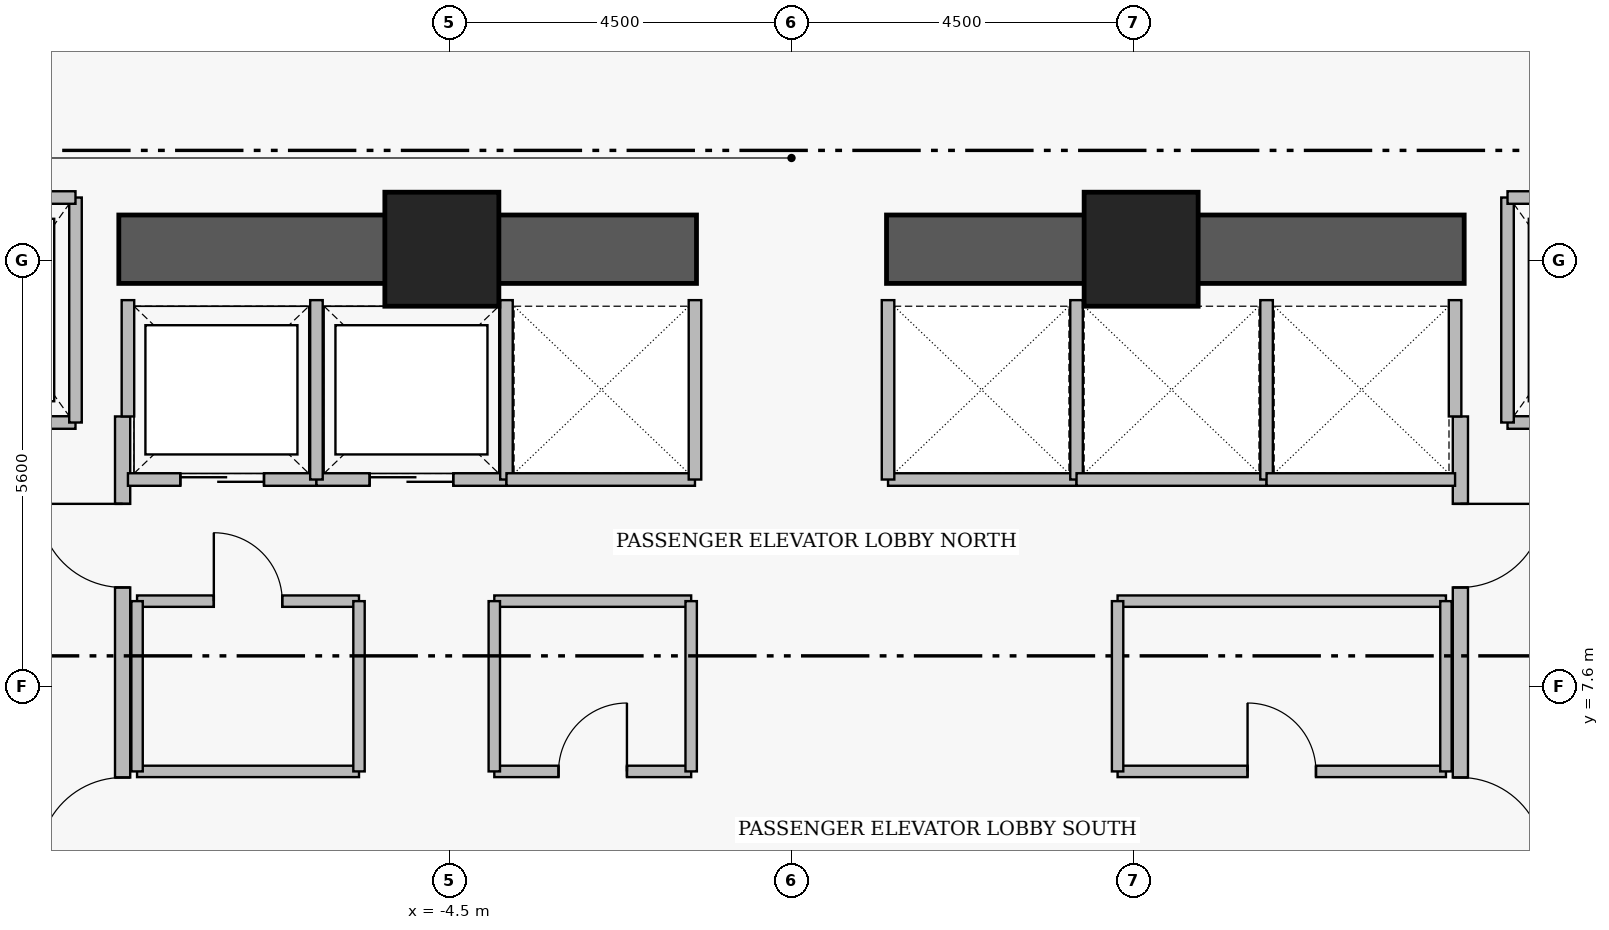
"""IFC4 building model, lengths in metres.
Left out: names, types, materials, properties, quantities, classifications, styles, units other than length and angle.
Written with IfcOpenShell. Run it as: python <this file> out.ifc"""

import sys

from ifc_helpers import new_model, si_unit, direction, frame, frame_2d, origin, origin_2d, place, context, subcontext, project, spatial, rectangle, extrude, element, fill, save


model = new_model("IFC4")
c1 = context("Model", 3, precision=1e-05, world=origin(), true_north=direction((0.0, 1.0)))
c2 = subcontext(c1, "Body", "Model", "MODEL_VIEW")
j1 = project(units=[si_unit("LENGTHUNIT", "METRE"), si_unit("PLANEANGLEUNIT", "RADIAN")], contexts=[c1])
p1 = place(None, origin())
s1 = spatial("IfcSite", under=j1, at=p1, CompositionType="ELEMENT")
p2 = place(p1, origin())
s2 = spatial("IfcBuilding", under=s1, at=p2, CompositionType="ELEMENT")
p3 = place(p2, frame((0.0, 0.0, 27.6)))
s3 = spatial("IfcBuildingStorey", under=s2, at=p3, CompositionType="ELEMENT", Elevation=27.6)
for number, where, z_axis, x_axis in (
    (1, (-8.85, 13.35, 0.0), (0.0, 0.0, 1.0), (1.0, 0.0, 0.0)),
    (2, (1.25, 13.35, 0.0), (0.0, 0.0, 1.0), (1.0, 0.0, 0.0)),
):
    element("IfcWall", number, at=place(p3, frame(where, z_axis=z_axis, x_axis=x_axis)), inside=s3, PredefinedType="SHEAR", context=c2, shape_type="SweptSolid", body=[
        extrude(rectangle(XDim=7.6, YDim=0.9, at=frame_2d((3.8, 0.0))), origin(), (0.0, 0.0, 1.0), 3.43),
    ])
for number, where, z_axis, x_axis in (
    (3, (-4.6, 13.35, 0.0), (0.0, 0.0, 1.0), (1.0, 0.0, 0.0)),
    (4, (4.6, 13.35, 0.0), (0.0, 0.0, 1.0), (1.0, 0.0, 0.0)),
):
    element("IfcColumn", number, at=place(p3, frame(where, z_axis=z_axis, x_axis=x_axis)), inside=s3, PredefinedType="COLUMN", context=c2, shape_type="SweptSolid", body=[
        extrude(rectangle(XDim=1.5, YDim=1.5, at=origin_2d()), origin(), (0.0, 0.0, 1.0), 3.65),
    ])
p4 = place(p3, frame((-8.8, 5.05, 0.0), z_axis=(0.0, 0.0, 1.0), x_axis=(0.0, 1.0, 0.0)))
e5 = element("IfcWall", 5, at=p4, inside=s3, PredefinedType="PARTITIONING", context=c2, shape_type="SweptSolid", body=[
    extrude(rectangle(XDim=6.1, YDim=0.2, at=frame_2d((3.05, 0.0))), origin(), (0.0, 0.0, 1.0), 3.43),
])
p5 = place(p4, frame((0.25, 0.0, 0.0)))
e6 = element("IfcOpeningElement", 6, at=p5, cuts=e5, PredefinedType="OPENING", context=c2, shape_type="SweptSolid", body=[
    extrude(rectangle(XDim=1.1, YDim=2.2, at=frame_2d((0.55, 1.1))), frame((0.0, 0.11, 0.0), z_axis=(0.0, -1.0, 0.0), x_axis=(1.0, 0.0, 0.0)), (0.0, 0.0, 1.0), 0.22),
])
p6 = place(p4, frame((3.85, 0.0, 0.0)))
e7 = element("IfcOpeningElement", 7, at=p6, cuts=e5, PredefinedType="OPENING", context=c2, shape_type="SweptSolid", body=[
    extrude(rectangle(XDim=1.1, YDim=2.2, at=frame_2d((0.55, 1.1))), frame((0.0, 0.11, 0.0), z_axis=(0.0, -1.0, 0.0), x_axis=(1.0, 0.0, 0.0)), (0.0, 0.0, 1.0), 0.22),
])
p7 = place(p3, frame((8.8, 11.15, 0.0), z_axis=(0.0, 0.0, 1.0), x_axis=(0.0, -1.0, 0.0)))
e8 = element("IfcWall", 8, at=p7, inside=s3, PredefinedType="PARTITIONING", context=c2, shape_type="SweptSolid", body=[
    extrude(rectangle(XDim=6.1, YDim=0.2, at=frame_2d((3.05, 0.0))), origin(), (0.0, 0.0, 1.0), 3.43),
])
p8 = place(p7, frame((1.15, 0.0, 0.0)))
e9 = element("IfcOpeningElement", 9, at=p8, cuts=e8, PredefinedType="OPENING", context=c2, shape_type="SweptSolid", body=[
    extrude(rectangle(XDim=1.1, YDim=2.2, at=frame_2d((0.55, 1.1))), frame((0.0, 0.11, 0.0), z_axis=(0.0, -1.0, 0.0), x_axis=(1.0, 0.0, 0.0)), (0.0, 0.0, 1.0), 0.22),
])
p9 = place(p7, frame((4.75, 0.0, 0.0)))
e10 = element("IfcOpeningElement", 10, at=p9, cuts=e8, PredefinedType="OPENING", context=c2, shape_type="SweptSolid", body=[
    extrude(rectangle(XDim=1.1, YDim=2.2, at=frame_2d((0.55, 1.1))), frame((0.0, 0.11, 0.0), z_axis=(0.0, -1.0, 0.0), x_axis=(1.0, 0.0, 0.0)), (0.0, 0.0, 1.0), 0.22),
])
p10 = place(p3, frame((-11.58, 11.07, 0.0), z_axis=(0.0, 0.0, 1.0), x_axis=(1.0, 0.0, 0.0)))
e11 = element("IfcWall", 11, at=p10, inside=s3, PredefinedType="PARTITIONING", context=c2, shape_type="SweptSolid", body=[
    extrude(rectangle(XDim=2.16, YDim=0.165, at=frame_2d((1.08, 0.0))), origin(), (0.0, 0.0, 1.0), 3.43),
])
p11 = place(p10, frame((0.53, 0.0, 0.0)))
e12 = element("IfcOpeningElement", 12, at=p11, cuts=e11, PredefinedType="OPENING", context=c2, shape_type="SweptSolid", body=[
    extrude(rectangle(XDim=1.15, YDim=2.25, at=frame_2d((0.575, 1.125))), frame((0.0, 0.093, 0.0), z_axis=(0.0, -1.0, 0.0), x_axis=(1.0, 0.0, 0.0)), (0.0, 0.0, 1.0), 0.185),
])
p12 = place(p3, frame((9.42, 11.07, 0.0), z_axis=(0.0, 0.0, 1.0), x_axis=(1.0, 0.0, 0.0)))
e13 = element("IfcWall", 13, at=p12, inside=s3, PredefinedType="PARTITIONING", context=c2, shape_type="SweptSolid", body=[
    extrude(rectangle(XDim=2.16, YDim=0.165, at=frame_2d((1.08, 0.0))), origin(), (0.0, 0.0, 1.0), 3.43),
])
p13 = place(p12, frame((0.53, 0.0, 0.0)))
e14 = element("IfcOpeningElement", 14, at=p13, cuts=e13, PredefinedType="OPENING", context=c2, shape_type="SweptSolid", body=[
    extrude(rectangle(XDim=1.15, YDim=2.25, at=frame_2d((0.575, 1.125))), frame((0.0, 0.093, 0.0), z_axis=(0.0, -1.0, 0.0), x_axis=(1.0, 0.0, 0.0)), (0.0, 0.0, 1.0), 0.185),
])
p14 = place(p3, frame((-8.73, 10.32, 0.0), z_axis=(0.0, 0.0, 1.0), x_axis=(1.0, 0.0, 0.0)))
e15 = element("IfcWall", 15, at=p14, inside=s3, PredefinedType="PARTITIONING", context=c2, shape_type="SweptSolid", body=[
    extrude(rectangle(XDim=2.48, YDim=0.165, at=frame_2d((1.24, 0.0))), origin(), (0.0, 0.0, 1.0), 3.43),
])
p15 = place(p14, frame((0.69, 0.0, 0.0)))
e16 = element("IfcOpeningElement", 16, at=p15, cuts=e15, PredefinedType="OPENING", context=c2, shape_type="SweptSolid", body=[
    extrude(rectangle(XDim=1.1, YDim=2.25, at=frame_2d((0.55, 1.125))), frame((0.0, 0.093, 0.0), z_axis=(0.0, -1.0, 0.0), x_axis=(1.0, 0.0, 0.0)), (0.0, 0.0, 1.0), 0.185),
])
p16 = place(p3, frame((-6.25, 10.32, 0.0), z_axis=(0.0, 0.0, 1.0), x_axis=(1.0, 0.0, 0.0)))
e17 = element("IfcWall", 17, at=p16, inside=s3, PredefinedType="PARTITIONING", context=c2, shape_type="SweptSolid", body=[
    extrude(rectangle(XDim=2.5, YDim=0.165, at=frame_2d((1.25, 0.0))), origin(), (0.0, 0.0, 1.0), 3.43),
])
p17 = place(p16, frame((0.7, 0.0, 0.0)))
e18 = element("IfcOpeningElement", 18, at=p17, cuts=e17, PredefinedType="OPENING", context=c2, shape_type="SweptSolid", body=[
    extrude(rectangle(XDim=1.1, YDim=2.25, at=frame_2d((0.55, 1.125))), frame((0.0, 0.093, 0.0), z_axis=(0.0, -1.0, 0.0), x_axis=(1.0, 0.0, 0.0)), (0.0, 0.0, 1.0), 0.185),
])
p18 = place(p3, frame((-8.61, 8.72, 0.0), z_axis=(0.0, 0.0, 1.0), x_axis=(1.0, 0.0, 0.0)))
e19 = element("IfcWall", 19, at=p18, inside=s3, PredefinedType="PARTITIONING", context=c2, shape_type="SweptSolid", body=[
    extrude(rectangle(XDim=2.92, YDim=0.15, at=frame_2d((1.46, 0.0))), origin(), (0.0, 0.0, 1.0), 3.43),
])
p19 = place(p18, frame((1.01, 0.0, 0.0)))
e20 = element("IfcOpeningElement", 20, at=p19, cuts=e19, PredefinedType="OPENING", context=c2, shape_type="SweptSolid", body=[
    extrude(rectangle(XDim=0.9, YDim=2.15, at=frame_2d((0.45, 1.075))), frame((0.0, 0.085, 0.0), z_axis=(0.0, -1.0, 0.0), x_axis=(1.0, 0.0, 0.0)), (0.0, 0.0, 1.0), 0.17),
])
p20 = place(p3, frame((-3.91, 6.48, 0.0), z_axis=(0.0, 0.0, 1.0), x_axis=(1.0, 0.0, 0.0)))
e21 = element("IfcWall", 21, at=p20, inside=s3, PredefinedType="PARTITIONING", context=c2, shape_type="SweptSolid", body=[
    extrude(rectangle(XDim=2.59, YDim=0.15, at=frame_2d((1.295, 0.0))), origin(), (0.0, 0.0, 1.0), 3.43),
])
p21 = place(p20, frame((0.845, 0.0, 0.0)))
e22 = element("IfcOpeningElement", 22, at=p21, cuts=e21, PredefinedType="OPENING", context=c2, shape_type="SweptSolid", body=[
    extrude(rectangle(XDim=0.9, YDim=2.15, at=frame_2d((0.45, 1.075))), frame((0.0, 0.085, 0.0), z_axis=(0.0, -1.0, 0.0), x_axis=(1.0, 0.0, 0.0)), (0.0, 0.0, 1.0), 0.17),
])
p22 = place(p3, frame((4.29, 6.48, 0.0), z_axis=(0.0, 0.0, 1.0), x_axis=(1.0, 0.0, 0.0)))
e23 = element("IfcWall", 23, at=p22, inside=s3, PredefinedType="PARTITIONING", context=c2, shape_type="SweptSolid", body=[
    extrude(rectangle(XDim=4.32, YDim=0.15, at=frame_2d((2.16, 0.0))), origin(), (0.0, 0.0, 1.0), 3.43),
])
p23 = place(p22, frame((1.71, 0.0, 0.0)))
e24 = element("IfcOpeningElement", 24, at=p23, cuts=e23, PredefinedType="OPENING", context=c2, shape_type="SweptSolid", body=[
    extrude(rectangle(XDim=0.9, YDim=2.15, at=frame_2d((0.45, 1.075))), frame((0.0, 0.085, 0.0), z_axis=(0.0, -1.0, 0.0), x_axis=(1.0, 0.0, 0.0)), (0.0, 0.0, 1.0), 0.17),
])
p24 = place(p3, frame((-9.42, 11.07, 0.0), z_axis=(0.0, 0.0, 1.0), x_axis=(0.0, 1.0, 0.0)))
e25 = element("IfcWall", 25, at=p24, inside=s3, PredefinedType="PARTITIONING", context=c2, shape_type="SweptSolid", body=[
    extrude(rectangle(XDim=2.96, YDim=0.165, at=frame_2d((1.48, 0.0))), origin(), (0.0, 0.0, 1.0), 3.43),
])
p25 = place(p3, frame((-11.58, 14.03, 0.0), z_axis=(0.0, 0.0, 1.0), x_axis=(1.0, 0.0, 0.0)))
e26 = element("IfcWall", 26, at=p25, inside=s3, PredefinedType="PARTITIONING", context=c2, shape_type="SweptSolid", body=[
    extrude(rectangle(XDim=2.16, YDim=0.165, at=frame_2d((1.08, 0.0))), origin(), (0.0, 0.0, 1.0), 3.43),
])
p26 = place(p3, frame((9.42, 11.07, 0.0), z_axis=(0.0, 0.0, 1.0), x_axis=(0.0, 1.0, 0.0)))
e27 = element("IfcWall", 27, at=p26, inside=s3, PredefinedType="PARTITIONING", context=c2, shape_type="SweptSolid", body=[
    extrude(rectangle(XDim=2.96, YDim=0.165, at=frame_2d((1.48, 0.0))), origin(), (0.0, 0.0, 1.0), 3.43),
])
p27 = place(p3, frame((9.42, 14.03, 0.0), z_axis=(0.0, 0.0, 1.0), x_axis=(1.0, 0.0, 0.0)))
e28 = element("IfcWall", 28, at=p27, inside=s3, PredefinedType="PARTITIONING", context=c2, shape_type="SweptSolid", body=[
    extrude(rectangle(XDim=2.16, YDim=0.165, at=frame_2d((1.08, 0.0))), origin(), (0.0, 0.0, 1.0), 3.43),
])
p28 = place(p3, frame((-8.73, 11.15, 0.0), z_axis=(0.0, 0.0, 1.0), x_axis=(0.0, 1.0, 0.0)))
e29 = element("IfcWall", 29, at=p28, inside=s3, PredefinedType="PARTITIONING", context=c2, shape_type="SweptSolid", body=[
    extrude(rectangle(XDim=1.53, YDim=0.165, at=frame_2d((0.765, 0.0))), origin(), (0.0, 0.0, 1.0), 3.43),
])
for number, where, z_axis, x_axis in (
    (30, (-6.25, 10.32, 0.0), (0.0, 0.0, 1.0), (0.0, 1.0, 0.0)),
    (31, (-3.75, 10.32, 0.0), (0.0, 0.0, 1.0), (0.0, 1.0, 0.0)),
):
    element("IfcWall", number, at=place(p3, frame(where, z_axis=z_axis, x_axis=x_axis)), inside=s3, PredefinedType="PARTITIONING", context=c2, shape_type="SweptSolid", body=[
        extrude(rectangle(XDim=2.36, YDim=0.165, at=frame_2d((1.18, 0.0))), origin(), (0.0, 0.0, 1.0), 3.43),
    ])
p29 = place(p3, frame((-3.75, 10.32, 0.0), z_axis=(0.0, 0.0, 1.0), x_axis=(1.0, 0.0, 0.0)))
e32 = element("IfcWall", 32, at=p29, inside=s3, PredefinedType="PARTITIONING", context=c2, shape_type="SweptSolid", body=[
    extrude(rectangle(XDim=2.48, YDim=0.165, at=frame_2d((1.24, 0.0))), origin(), (0.0, 0.0, 1.0), 3.43),
])
p30 = place(p3, frame((-1.27, 10.32, 0.0), z_axis=(0.0, 0.0, 1.0), x_axis=(0.0, 1.0, 0.0)))
e33 = element("IfcWall", 33, at=p30, inside=s3, PredefinedType="PARTITIONING", context=c2, shape_type="SweptSolid", body=[
    extrude(rectangle(XDim=2.36, YDim=0.165, at=frame_2d((1.18, 0.0))), origin(), (0.0, 0.0, 1.0), 3.43),
])
p31 = place(p3, frame((1.27, 10.32, 0.0), z_axis=(0.0, 0.0, 1.0), x_axis=(1.0, 0.0, 0.0)))
e34 = element("IfcWall", 34, at=p31, inside=s3, PredefinedType="PARTITIONING", context=c2, shape_type="SweptSolid", body=[
    extrude(rectangle(XDim=2.48, YDim=0.165, at=frame_2d((1.24, 0.0))), origin(), (0.0, 0.0, 1.0), 3.43),
])
for number, where, z_axis, x_axis in (
    (35, (1.27, 10.32, 0.0), (0.0, 0.0, 1.0), (0.0, 1.0, 0.0)),
    (36, (3.75, 10.32, 0.0), (0.0, 0.0, 1.0), (0.0, 1.0, 0.0)),
):
    element("IfcWall", number, at=place(p3, frame(where, z_axis=z_axis, x_axis=x_axis)), inside=s3, PredefinedType="PARTITIONING", context=c2, shape_type="SweptSolid", body=[
        extrude(rectangle(XDim=2.36, YDim=0.165, at=frame_2d((1.18, 0.0))), origin(), (0.0, 0.0, 1.0), 3.43),
    ])
p32 = place(p3, frame((3.75, 10.32, 0.0), z_axis=(0.0, 0.0, 1.0), x_axis=(1.0, 0.0, 0.0)))
e37 = element("IfcWall", 37, at=p32, inside=s3, PredefinedType="PARTITIONING", context=c2, shape_type="SweptSolid", body=[
    extrude(rectangle(XDim=2.5, YDim=0.165, at=frame_2d((1.25, 0.0))), origin(), (0.0, 0.0, 1.0), 3.43),
])
p33 = place(p3, frame((6.25, 10.32, 0.0), z_axis=(0.0, 0.0, 1.0), x_axis=(0.0, 1.0, 0.0)))
e38 = element("IfcWall", 38, at=p33, inside=s3, PredefinedType="PARTITIONING", context=c2, shape_type="SweptSolid", body=[
    extrude(rectangle(XDim=2.36, YDim=0.165, at=frame_2d((1.18, 0.0))), origin(), (0.0, 0.0, 1.0), 3.43),
])
p34 = place(p3, frame((6.25, 10.32, 0.0), z_axis=(0.0, 0.0, 1.0), x_axis=(1.0, 0.0, 0.0)))
e39 = element("IfcWall", 39, at=p34, inside=s3, PredefinedType="PARTITIONING", context=c2, shape_type="SweptSolid", body=[
    extrude(rectangle(XDim=2.48, YDim=0.165, at=frame_2d((1.24, 0.0))), origin(), (0.0, 0.0, 1.0), 3.43),
])
p35 = place(p3, frame((8.73, 11.15, 0.0), z_axis=(0.0, 0.0, 1.0), x_axis=(0.0, 1.0, 0.0)))
e40 = element("IfcWall", 40, at=p35, inside=s3, PredefinedType="PARTITIONING", context=c2, shape_type="SweptSolid", body=[
    extrude(rectangle(XDim=1.53, YDim=0.165, at=frame_2d((0.765, 0.0))), origin(), (0.0, 0.0, 1.0), 3.43),
])
p36 = place(p3, frame((-8.61, 6.48, 0.0), z_axis=(0.0, 0.0, 1.0), x_axis=(1.0, 0.0, 0.0)))
e41 = element("IfcWall", 41, at=p36, inside=s3, PredefinedType="PARTITIONING", context=c2, shape_type="SweptSolid", body=[
    extrude(rectangle(XDim=2.92, YDim=0.15, at=frame_2d((1.46, 0.0))), origin(), (0.0, 0.0, 1.0), 3.43),
])
for number, where, z_axis, x_axis in (
    (42, (-8.61, 6.48, 0.0), (0.0, 0.0, 1.0), (0.0, 1.0, 0.0)),
    (43, (-5.69, 6.48, 0.0), (0.0, 0.0, 1.0), (0.0, 1.0, 0.0)),
):
    element("IfcWall", number, at=place(p3, frame(where, z_axis=z_axis, x_axis=x_axis)), inside=s3, PredefinedType="PARTITIONING", context=c2, shape_type="SweptSolid", body=[
        extrude(rectangle(XDim=2.24, YDim=0.15, at=frame_2d((1.12, 0.0))), origin(), (0.0, 0.0, 1.0), 3.43),
    ])
p37 = place(p3, frame((-3.91, 8.72, 0.0), z_axis=(0.0, 0.0, 1.0), x_axis=(1.0, 0.0, 0.0)))
e44 = element("IfcWall", 44, at=p37, inside=s3, PredefinedType="PARTITIONING", context=c2, shape_type="SweptSolid", body=[
    extrude(rectangle(XDim=2.59, YDim=0.15, at=frame_2d((1.295, 0.0))), origin(), (0.0, 0.0, 1.0), 3.43),
])
for number, where, z_axis, x_axis in (
    (45, (-3.91, 6.48, 0.0), (0.0, 0.0, 1.0), (0.0, 1.0, 0.0)),
    (46, (-1.32, 6.48, 0.0), (0.0, 0.0, 1.0), (0.0, 1.0, 0.0)),
):
    element("IfcWall", number, at=place(p3, frame(where, z_axis=z_axis, x_axis=x_axis)), inside=s3, PredefinedType="PARTITIONING", context=c2, shape_type="SweptSolid", body=[
        extrude(rectangle(XDim=2.24, YDim=0.15, at=frame_2d((1.12, 0.0))), origin(), (0.0, 0.0, 1.0), 3.43),
    ])
p38 = place(p3, frame((4.29, 8.72, 0.0), z_axis=(0.0, 0.0, 1.0), x_axis=(1.0, 0.0, 0.0)))
e47 = element("IfcWall", 47, at=p38, inside=s3, PredefinedType="PARTITIONING", context=c2, shape_type="SweptSolid", body=[
    extrude(rectangle(XDim=4.32, YDim=0.15, at=frame_2d((2.16, 0.0))), origin(), (0.0, 0.0, 1.0), 3.43),
])
for number, where, z_axis, x_axis in (
    (48, (4.29, 6.48, 0.0), (0.0, 0.0, 1.0), (0.0, 1.0, 0.0)),
    (49, (8.61, 6.48, 0.0), (0.0, 0.0, 1.0), (0.0, 1.0, 0.0)),
):
    element("IfcWall", number, at=place(p3, frame(where, z_axis=z_axis, x_axis=x_axis)), inside=s3, PredefinedType="PARTITIONING", context=c2, shape_type="SweptSolid", body=[
        extrude(rectangle(XDim=2.24, YDim=0.15, at=frame_2d((1.12, 0.0))), origin(), (0.0, 0.0, 1.0), 3.43),
    ])
p39 = place(p5, origin())
e50 = element("IfcDoor", 50, at=p39, inside=s3, OperationType="SINGLE_SWING_LEFT", PredefinedType="DOOR", context=c2, shape_type="SweptSolid", body=[
    extrude(rectangle(XDim=1.1, YDim=2.2, at=frame_2d((0.55, 1.1))), frame((0.0, 0.025, 0.0), z_axis=(0.0, -1.0, 0.0), x_axis=(1.0, 0.0, 0.0)), (0.0, 0.0, 1.0), 0.05),
])
fill(e6, e50)
p40 = place(p6, origin())
e51 = element("IfcDoor", 51, at=p40, inside=s3, OperationType="SINGLE_SWING_RIGHT", PredefinedType="DOOR", context=c2, shape_type="SweptSolid", body=[
    extrude(rectangle(XDim=1.1, YDim=2.2, at=frame_2d((0.55, 1.1))), frame((0.0, 0.025, 0.0), z_axis=(0.0, -1.0, 0.0), x_axis=(1.0, 0.0, 0.0)), (0.0, 0.0, 1.0), 0.05),
])
fill(e7, e51)
p41 = place(p8, origin())
e52 = element("IfcDoor", 52, at=p41, inside=s3, OperationType="SINGLE_SWING_LEFT", PredefinedType="DOOR", context=c2, shape_type="SweptSolid", body=[
    extrude(rectangle(XDim=1.1, YDim=2.2, at=frame_2d((0.55, 1.1))), frame((0.0, 0.025, 0.0), z_axis=(0.0, -1.0, 0.0), x_axis=(1.0, 0.0, 0.0)), (0.0, 0.0, 1.0), 0.05),
])
fill(e9, e52)
p42 = place(p9, origin())
e53 = element("IfcDoor", 53, at=p42, inside=s3, OperationType="SINGLE_SWING_RIGHT", PredefinedType="DOOR", context=c2, shape_type="SweptSolid", body=[
    extrude(rectangle(XDim=1.1, YDim=2.2, at=frame_2d((0.55, 1.1))), frame((0.0, 0.025, 0.0), z_axis=(0.0, -1.0, 0.0), x_axis=(1.0, 0.0, 0.0)), (0.0, 0.0, 1.0), 0.05),
])
fill(e10, e53)
p43 = place(p15, origin())
e54 = element("IfcDoor", 54, at=p43, inside=s3, OperationType="SLIDING_TO_LEFT", PredefinedType="DOOR", context=c2, shape_type="SweptSolid", body=[
    extrude(rectangle(XDim=1.1, YDim=2.25, at=frame_2d((0.55, 1.125))), frame((0.0, 0.025, 0.0), z_axis=(0.0, -1.0, 0.0), x_axis=(1.0, 0.0, 0.0)), (0.0, 0.0, 1.0), 0.05),
])
fill(e16, e54)
p44 = place(p17, origin())
e55 = element("IfcDoor", 55, at=p44, inside=s3, OperationType="SLIDING_TO_LEFT", PredefinedType="DOOR", context=c2, shape_type="SweptSolid", body=[
    extrude(rectangle(XDim=1.1, YDim=2.25, at=frame_2d((0.55, 1.125))), frame((0.0, 0.025, 0.0), z_axis=(0.0, -1.0, 0.0), x_axis=(1.0, 0.0, 0.0)), (0.0, 0.0, 1.0), 0.05),
])
fill(e18, e55)
p45 = place(p19, origin())
e56 = element("IfcDoor", 56, at=p45, inside=s3, OperationType="SINGLE_SWING_LEFT", PredefinedType="DOOR", context=c2, shape_type="SweptSolid", body=[
    extrude(rectangle(XDim=0.9, YDim=2.15, at=frame_2d((0.45, 1.075))), frame((0.0, 0.025, 0.0), z_axis=(0.0, -1.0, 0.0), x_axis=(1.0, 0.0, 0.0)), (0.0, 0.0, 1.0), 0.05),
])
fill(e20, e56)
p46 = place(p21, origin())
e57 = element("IfcDoor", 57, at=p46, inside=s3, OperationType="SINGLE_SWING_RIGHT", PredefinedType="DOOR", context=c2, shape_type="SweptSolid", body=[
    extrude(rectangle(XDim=0.9, YDim=2.15, at=frame_2d((0.45, 1.075))), frame((0.0, 0.025, 0.0), z_axis=(0.0, -1.0, 0.0), x_axis=(1.0, 0.0, 0.0)), (0.0, 0.0, 1.0), 0.05),
])
fill(e22, e57)
p47 = place(p23, origin())
e58 = element("IfcDoor", 58, at=p47, inside=s3, OperationType="SINGLE_SWING_LEFT", PredefinedType="DOOR", context=c2, shape_type="SweptSolid", body=[
    extrude(rectangle(XDim=0.9, YDim=2.15, at=frame_2d((0.45, 1.075))), frame((0.0, 0.025, 0.0), z_axis=(0.0, -1.0, 0.0), x_axis=(1.0, 0.0, 0.0)), (0.0, 0.0, 1.0), 0.05),
])
fill(e24, e58)
save(model, sys.argv[1])
